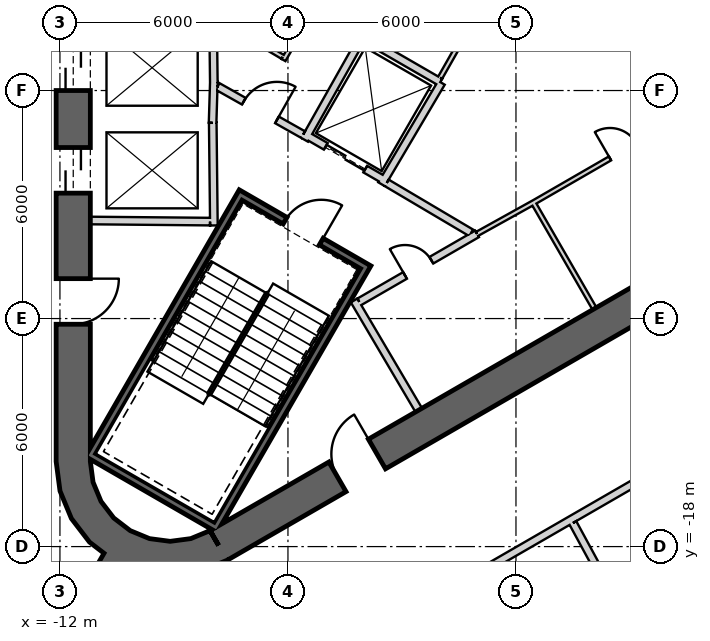
"""IFC4 building model, lengths in metres.
Left out: names, types, materials, properties, quantities, classifications, styles, units other than length and angle.
Written with IfcOpenShell. Run it as: python <this file> out.ifc"""

import sys

from ifc_helpers import new_model, si_unit, direction, frame, frame_2d, origin, place, context, subcontext, project, spatial, polyline, rectangle, outline, extrude, element, fill, save


model = new_model("IFC4")
c1 = context("Model", 3, precision=1e-05, world=origin(), true_north=direction((0.0, 1.0)))
c2 = subcontext(c1, "Body", "Model", "MODEL_VIEW")
j1 = project(units=[si_unit("LENGTHUNIT", "METRE"), si_unit("PLANEANGLEUNIT", "RADIAN")], contexts=[c1])
p1 = place(None, origin())
s1 = spatial("IfcSite", under=j1, at=p1, CompositionType="ELEMENT")
p2 = place(p1, origin())
s2 = spatial("IfcBuilding", under=s1, at=p2, CompositionType="ELEMENT")
p3 = place(p2, frame((0.0, 0.0, 322.1)))
s3 = spatial("IfcBuildingStorey", under=s2, at=p3, CompositionType="ELEMENT", Elevation=322.1)
p4 = place(p3, frame((-11.65, 15.762, 0.0), z_axis=(0.0, 0.0, 1.0), x_axis=(0.0, -1.0, 0.0)))
e1 = element("IfcWall", 1, at=p4, inside=s3, PredefinedType="SHEAR", context=c2, shape_type="SweptSolid", body=[
    extrude(rectangle(XDim=31.523, YDim=0.9, at=frame_2d((15.762, 0.0))), origin(), (0.0, 0.0, 1.0), 3.9),
])
p5 = place(p4, frame((7.062, 0.0, 0.0)))
e2 = element("IfcOpeningElement", 2, at=p5, cuts=e1, PredefinedType="OPENING", context=c2, shape_type="SweptSolid", body=[
    extrude(rectangle(XDim=1.2, YDim=2.4, at=frame_2d((0.6, 1.2))), frame((0.0, 0.46, 0.0), z_axis=(0.0, -1.0, 0.0), x_axis=(1.0, 0.0, 0.0)), (0.0, 0.0, 1.0), 0.92),
])
p6 = place(p4, frame((9.762, 0.0, 0.0)))
e3 = element("IfcOpeningElement", 3, at=p6, cuts=e1, PredefinedType="OPENING", context=c2, shape_type="SweptSolid", body=[
    extrude(rectangle(XDim=1.2, YDim=2.4, at=frame_2d((0.6, 1.2))), frame((0.0, 0.46, 0.0), z_axis=(0.0, -1.0, 0.0), x_axis=(1.0, 0.0, 0.0)), (0.0, 0.0, 1.0), 0.92),
])
p7 = place(p4, frame((12.462, 0.0, 0.0)))
e4 = element("IfcOpeningElement", 4, at=p7, cuts=e1, PredefinedType="OPENING", context=c2, shape_type="SweptSolid", body=[
    extrude(rectangle(XDim=1.2, YDim=2.4, at=frame_2d((0.6, 1.2))), frame((0.0, 0.46, 0.0), z_axis=(0.0, -1.0, 0.0), x_axis=(1.0, 0.0, 0.0)), (0.0, 0.0, 1.0), 0.92),
])
p8 = place(p4, frame((15.162, 0.0, 0.0)))
e5 = element("IfcOpeningElement", 5, at=p8, cuts=e1, PredefinedType="OPENING", context=c2, shape_type="SweptSolid", body=[
    extrude(rectangle(XDim=1.2, YDim=2.4, at=frame_2d((0.6, 1.2))), frame((0.0, 0.46, 0.0), z_axis=(0.0, -1.0, 0.0), x_axis=(1.0, 0.0, 0.0)), (0.0, 0.0, 1.0), 0.92),
])
p9 = place(p4, frame((17.862, 0.0, 0.0)))
e6 = element("IfcOpeningElement", 6, at=p9, cuts=e1, PredefinedType="OPENING", context=c2, shape_type="SweptSolid", body=[
    extrude(rectangle(XDim=1.2, YDim=2.4, at=frame_2d((0.6, 1.2))), frame((0.0, 0.46, 0.0), z_axis=(0.0, -1.0, 0.0), x_axis=(1.0, 0.0, 0.0)), (0.0, 0.0, 1.0), 0.92),
])
p10 = place(p4, frame((20.562, 0.0, 0.0)))
e7 = element("IfcOpeningElement", 7, at=p10, cuts=e1, PredefinedType="OPENING", context=c2, shape_type="SweptSolid", body=[
    extrude(rectangle(XDim=1.2, YDim=2.4, at=frame_2d((0.6, 1.2))), frame((0.0, 0.46, 0.0), z_axis=(0.0, -1.0, 0.0), x_axis=(1.0, 0.0, 0.0)), (0.0, 0.0, 1.0), 0.92),
])
p11 = place(p4, frame((23.262, 0.0, 0.0)))
e8 = element("IfcOpeningElement", 8, at=p11, cuts=e1, PredefinedType="OPENING", context=c2, shape_type="SweptSolid", body=[
    extrude(rectangle(XDim=1.2, YDim=2.4, at=frame_2d((0.6, 1.2))), frame((0.0, 0.46, 0.0), z_axis=(0.0, -1.0, 0.0), x_axis=(1.0, 0.0, 0.0)), (0.0, 0.0, 1.0), 0.92),
])
p12 = place(p4, frame((3.612, 0.0, 0.0)))
e9 = element("IfcOpeningElement", 9, at=p12, cuts=e1, PredefinedType="OPENING", context=c2, shape_type="SweptSolid", body=[
    extrude(rectangle(XDim=1.2, YDim=2.4, at=frame_2d((0.6, 1.2))), frame((0.0, 0.46, 0.0), z_axis=(0.0, -1.0, 0.0), x_axis=(1.0, 0.0, 0.0)), (0.0, 0.0, 1.0), 0.92),
])
p13 = place(p4, frame((26.712, 0.0, 0.0)))
e10 = element("IfcOpeningElement", 10, at=p13, cuts=e1, PredefinedType="OPENING", context=c2, shape_type="SweptSolid", body=[
    extrude(rectangle(XDim=1.2, YDim=2.4, at=frame_2d((0.6, 1.2))), frame((0.0, 0.46, 0.0), z_axis=(0.0, -1.0, 0.0), x_axis=(1.0, 0.0, 0.0)), (0.0, 0.0, 1.0), 0.92),
])
p14 = place(p3, frame((-7.825, -17.97, 0.0), z_axis=(0.0, 0.0, 1.0), x_axis=(0.866028369851, 0.499994862586, 0.0)))
e11 = element("IfcWall", 11, at=p14, inside=s3, PredefinedType="SHEAR", context=c2, shape_type="SweptSolid", body=[
    extrude(rectangle(XDim=31.523, YDim=0.9, at=frame_2d((15.762, 0.0))), origin(), (0.0, 0.0, 1.0), 3.9),
])
p15 = place(p14, frame((17.862, 0.0, 0.0)))
e12 = element("IfcOpeningElement", 12, at=p15, cuts=e11, PredefinedType="OPENING", context=c2, shape_type="SweptSolid", body=[
    extrude(rectangle(XDim=1.2, YDim=2.4, at=frame_2d((0.6, 1.2))), frame((0.0, 0.46, 0.0), z_axis=(0.0, -1.0, 0.0), x_axis=(1.0, 0.0, 0.0)), (0.0, 0.0, 1.0), 0.92),
])
p16 = place(p14, frame((20.562, 0.0, 0.0)))
e13 = element("IfcOpeningElement", 13, at=p16, cuts=e11, PredefinedType="OPENING", context=c2, shape_type="SweptSolid", body=[
    extrude(rectangle(XDim=1.2, YDim=2.4, at=frame_2d((0.6, 1.2))), frame((0.0, 0.46, 0.0), z_axis=(0.0, -1.0, 0.0), x_axis=(1.0, 0.0, 0.0)), (0.0, 0.0, 1.0), 0.92),
])
p17 = place(p14, frame((26.712, 0.0, 0.0)))
e14 = element("IfcOpeningElement", 14, at=p17, cuts=e11, PredefinedType="OPENING", context=c2, shape_type="SweptSolid", body=[
    extrude(rectangle(XDim=1.2, YDim=2.4, at=frame_2d((0.6, 1.2))), frame((0.0, 0.46, 0.0), z_axis=(0.0, -1.0, 0.0), x_axis=(1.0, 0.0, 0.0)), (0.0, 0.0, 1.0), 0.92),
])
p18 = place(p14, frame((3.612, 0.0, 0.0)))
e15 = element("IfcOpeningElement", 15, at=p18, cuts=e11, PredefinedType="OPENING", context=c2, shape_type="SweptSolid", body=[
    extrude(rectangle(XDim=1.2, YDim=2.4, at=frame_2d((0.6, 1.2))), frame((0.0, 0.46, 0.0), z_axis=(0.0, -1.0, 0.0), x_axis=(1.0, 0.0, 0.0)), (0.0, 0.0, 1.0), 0.92),
])
p19 = place(p3, origin())
e16 = element("IfcWall", 16, at=p19, inside=s3, PredefinedType="SHEAR", context=c2, shape_type="SweptSolid", body=[
    extrude(outline(polyline([(-12.1, -15.762), (-11.998, -16.538), (-11.698, -17.262), (-11.221, -17.883), (-10.6, -18.36), (-9.876, -18.659), (-9.1, -18.762), (-8.323, -18.659), (-7.6, -18.36), (-8.05, -17.58), (-8.556, -17.79), (-9.1, -17.862), (-9.644, -17.79), (-10.15, -17.58), (-10.585, -17.247), (-10.919, -16.812), (-11.128, -16.305), (-11.2, -15.762), (-12.1, -15.762)])), origin(), (0.0, 0.0, 1.0), 3.9),
])
p20 = place(p3, frame((-10.575, -18.316, 0.0), z_axis=(0.0, 0.0, 1.0), x_axis=(-0.499987805019, -0.866032444446, 0.0)))
e17 = element("IfcWall", 17, at=p20, inside=s3, PredefinedType="SHEAR", context=c2, shape_type="SweptSolid", body=[
    extrude(rectangle(XDim=8.787, YDim=0.6, at=frame_2d((4.394, 0.0))), origin(), (0.0, 0.0, 1.0), 3.9),
])
p21 = place(p20, frame((1.4, 0.0, 0.0)))
e18 = element("IfcOpeningElement", 18, at=p21, cuts=e17, PredefinedType="OPENING", context=c2, shape_type="SweptSolid", body=[
    extrude(rectangle(XDim=1.4, YDim=2.4, at=frame_2d((0.7, 1.2))), frame((0.0, 0.31, 0.0), z_axis=(0.0, -1.0, 0.0), x_axis=(1.0, 0.0, 0.0)), (0.0, 0.0, 1.0), 0.62),
])
p22 = place(p3, frame((-7.95, -5.772, 0.0), z_axis=(0.0, 0.0, 1.0), x_axis=(-0.030803413295, -0.999525462272, 0.0)))
e19 = element("IfcWall", 19, at=p22, inside=s3, PredefinedType="PLUMBINGWALL", context=c2, shape_type="SweptSolid", body=[
    extrude(rectangle(XDim=1.078, YDim=0.2, at=frame_2d((0.539, 0.0))), origin(), (0.0, 0.0, 1.0), 3.6),
])
p23 = place(p3, frame((-7.971, -4.05, 0.0), z_axis=(0.0, 0.0, 1.0), x_axis=(0.012042535896, -0.999927486035, 0.0)))
e20 = element("IfcWall", 20, at=p23, inside=s3, PredefinedType="PLUMBINGWALL", context=c2, shape_type="SweptSolid", body=[
    extrude(rectangle(XDim=1.845, YDim=0.2, at=frame_2d((0.922, 0.0))), origin(), (0.0, 0.0, 1.0), 3.6),
])
p24 = place(p3, frame((-7.979, -6.85, 0.0), z_axis=(0.0, 0.0, 1.0), x_axis=(0.011121475088, -0.999938154483, 0.0)))
e21 = element("IfcWall", 21, at=p24, inside=s3, PredefinedType="PLUMBINGWALL", context=c2, shape_type="SweptSolid", body=[
    extrude(rectangle(XDim=2.7, YDim=0.2, at=frame_2d((1.35, 0.0))), origin(), (0.0, 0.0, 1.0), 3.6),
])
p25 = place(p3, frame((-8.05, -9.449, 0.0), z_axis=(0.0, 0.0, 1.0), x_axis=(-0.999957467379, 0.009222983926, 0.0)))
e22 = element("IfcWall", 22, at=p25, inside=s3, PredefinedType="PLUMBINGWALL", context=c2, shape_type="SweptSolid", body=[
    extrude(rectangle(XDim=3.15, YDim=0.2, at=frame_2d((1.575, 0.0))), origin(), (0.0, 0.0, 1.0), 3.6),
])
p26 = place(p3, frame((-3.905, -10.563, -0.3), z_axis=(0.0, 0.0, 1.0), x_axis=(-0.500012932018, -0.866017937352, 0.0)))
e23 = element("IfcWall", 23, at=p26, inside=s3, PredefinedType="SHEAR", context=c2, shape_type="SweptSolid", body=[
    extrude(rectangle(XDim=8.1, YDim=0.2, at=frame_2d((4.05, 0.0))), origin(), (0.0, 0.0, 1.0), 3.9),
])
p27 = place(p3, frame((-11.282, -15.541, -0.3), z_axis=(0.0, 0.0, 1.0), x_axis=(0.866000483506, -0.500043160704, 0.0)))
e24 = element("IfcWall", 24, at=p27, inside=s3, PredefinedType="SHEAR", context=c2, shape_type="SweptSolid", body=[
    extrude(rectangle(XDim=3.8, YDim=0.2, at=frame_2d((1.9, 0.0))), origin(), (0.0, 0.0, 1.0), 3.9),
])
p28 = place(p3, frame((-7.196, -8.663, -0.3), z_axis=(0.0, 0.0, 1.0), x_axis=(-0.499997992926, -0.866026562566, 0.0)))
e25 = element("IfcWall", 25, at=p28, inside=s3, PredefinedType="SHEAR", context=c2, shape_type="SweptSolid", body=[
    extrude(rectangle(XDim=7.9, YDim=0.2, at=frame_2d((3.95, 0.0))), origin(), (0.0, 0.0, 1.0), 3.9),
])
p29 = place(p3, frame((-4.041, -10.599, -0.3), z_axis=(0.0, 0.0, 1.0), x_axis=(-0.866047807691, 0.499961193289, 0.0)))
e26 = element("IfcWall", 26, at=p29, inside=s3, PredefinedType="SHEAR", context=c2, shape_type="SweptSolid", body=[
    extrude(rectangle(XDim=3.6, YDim=0.2, at=frame_2d((1.8, 0.0))), origin(), (0.0, 0.0, 1.0), 3.9),
])
p30 = place(p29, frame((1.25, 0.0, 0.3)))
e27 = element("IfcOpeningElement", 27, at=p30, cuts=e26, PredefinedType="OPENING", context=c2, shape_type="SweptSolid", body=[
    extrude(rectangle(XDim=1.1, YDim=2.1, at=frame_2d((0.55, 1.05))), frame((0.0, 0.11, 0.0), z_axis=(0.0, -1.0, 0.0), x_axis=(1.0, 0.0, 0.0)), (0.0, 0.0, 1.0), 0.22),
])
p31 = place(p3, frame((-3.446, -8.368, 0.0), z_axis=(0.0, 0.0, 1.0), x_axis=(-0.866024647952, 0.500001309137, 0.0)))
e28 = element("IfcWall", 28, at=p31, inside=s3, PredefinedType="PLUMBINGWALL", context=c2, shape_type="SweptSolid", body=[
    extrude(rectangle(XDim=2.4, YDim=0.2, at=frame_2d((1.2, 0.0))), origin(), (0.0, 0.0, 1.0), 3.6),
])
p32 = place(p31, frame((0.6, 0.0, 0.0)))
e29 = element("IfcOpeningElement", 29, at=p32, cuts=e28, PredefinedType="OPENING", context=c2, shape_type="SweptSolid", body=[
    extrude(rectangle(XDim=1.2, YDim=2.4, at=frame_2d((0.6, 1.2))), frame((0.0, 0.11, 0.0), z_axis=(0.0, -1.0, 0.0), x_axis=(1.0, 0.0, 0.0)), (0.0, 0.0, 1.0), 0.22),
])
p33 = place(p3, frame((-1.961, -5.796, 0.0), z_axis=(0.0, 0.0, 1.0), x_axis=(-0.508647062354, -0.860975125052, 0.0)))
e30 = element("IfcWall", 30, at=p33, inside=s3, PredefinedType="PLUMBINGWALL", context=c2, shape_type="SweptSolid", body=[
    extrude(rectangle(XDim=3.1, YDim=0.2, at=frame_2d((1.55, 0.0))), origin(), (0.0, 0.0, 1.0), 3.6),
])
p34 = place(p3, frame((-3.99, -4.509, 0.0), z_axis=(0.0, 0.0, 1.0), x_axis=(-0.491358283181, -0.870957540612, 0.0)))
e31 = element("IfcWall", 31, at=p34, inside=s3, PredefinedType="PLUMBINGWALL", context=c2, shape_type="SweptSolid", body=[
    extrude(rectangle(XDim=3.2, YDim=0.2, at=frame_2d((1.6, 0.0))), origin(), (0.0, 0.0, 1.0), 3.6),
])
p35 = place(p3, frame((-3.953, -4.646, 0.0), z_axis=(0.0, 0.0, 1.0), x_axis=(0.866065302921, -0.4999308863, 0.0)))
e32 = element("IfcWall", 32, at=p35, inside=s3, PredefinedType="PLUMBINGWALL", context=c2, shape_type="SweptSolid", body=[
    extrude(rectangle(XDim=2.264, YDim=0.2, at=frame_2d((1.132, 0.0))), origin(), (0.0, 0.0, 1.0), 3.6),
])
p36 = place(p3, frame((2.067, -11.74, 0.0), z_axis=(0.0, 0.0, 1.0), x_axis=(-0.499984717929, 0.866034226713, 0.0)))
e33 = element("IfcWall", 33, at=p36, inside=s3, PredefinedType="PARTITIONING", context=c2, shape_type="SweptSolid", body=[
    extrude(rectangle(XDim=3.25, YDim=0.12, at=frame_2d((1.625, 0.0))), origin(), (0.0, 0.0, 1.0), 3.6),
])
p37 = place(p3, frame((-4.26, -11.524, 0.0), z_axis=(0.0, 0.0, 1.0), x_axis=(0.507997497166, -0.861358544901, 0.0)))
e34 = element("IfcWall", 34, at=p37, inside=s3, PredefinedType="PARTITIONING", context=c2, shape_type="SweptSolid", body=[
    extrude(rectangle(XDim=3.35, YDim=0.2, at=frame_2d((1.675, 0.0))), origin(), (0.0, 0.0, 1.0), 3.6),
])
p38 = place(p3, frame((-1.024, -9.771, 0.0), z_axis=(0.0, 0.0, 1.0), x_axis=(-0.866029903013, -0.499992207027, 0.0)))
e35 = element("IfcWall", 35, at=p38, inside=s3, PredefinedType="PARTITIONING", context=c2, shape_type="SweptSolid", body=[
    extrude(rectangle(XDim=3.578, YDim=0.2, at=frame_2d((1.789, 0.0))), origin(), (0.0, 0.0, 1.0), 3.6),
])
p39 = place(p38, frame((1.389, 0.0, 0.0)))
e36 = element("IfcOpeningElement", 36, at=p39, cuts=e35, PredefinedType="OPENING", context=c2, shape_type="SweptSolid", body=[
    extrude(rectangle(XDim=0.8, YDim=2.1, at=frame_2d((0.4, 1.05))), frame((0.0, 0.11, 0.0), z_axis=(0.0, -1.0, 0.0), x_axis=(1.0, 0.0, 0.0)), (0.0, 0.0, 1.0), 0.22),
])
p40 = place(p3, frame((-1.023, -9.772, 0.0), z_axis=(0.0, 0.0, 1.0), x_axis=(0.874290944206, 0.485402250592, 0.0)))
e37 = element("IfcWall", 37, at=p40, inside=s3, PredefinedType="PARTITIONING", context=c2, shape_type="SweptSolid", body=[
    extrude(rectangle(XDim=1.723, YDim=0.12, at=frame_2d((0.861, 0.0))), origin(), (0.0, 0.0, 1.0), 3.6),
])
p41 = place(p3, frame((0.483, -8.936, 0.0), z_axis=(0.0, 0.0, 1.0), x_axis=(0.866028230842, 0.499995103361, 0.0)))
e38 = element("IfcWall", 38, at=p41, inside=s3, PredefinedType="PARTITIONING", context=c2, shape_type="SweptSolid", body=[
    extrude(rectangle(XDim=5.4, YDim=0.12, at=frame_2d((2.7, 0.0))), origin(), (0.0, 0.0, 1.0), 3.6),
])
p42 = place(p41, frame((2.3, 0.0, 0.0)))
e39 = element("IfcOpeningElement", 39, at=p42, cuts=e38, PredefinedType="OPENING", context=c2, shape_type="SweptSolid", body=[
    extrude(rectangle(XDim=0.8, YDim=2.1, at=frame_2d((0.4, 1.05))), frame((0.0, 0.07, 0.0), z_axis=(0.0, -1.0, 0.0), x_axis=(1.0, 0.0, 0.0)), (0.0, 0.0, 1.0), 0.14),
])
p43 = place(p3, frame((-3.401, -8.43, 0.0), z_axis=(0.0, 0.0, 1.0), x_axis=(0.860630814782, -0.509229418482, 0.0)))
e40 = element("IfcWall", 40, at=p43, inside=s3, PredefinedType="PARTITIONING", context=c2, shape_type="SweptSolid", body=[
    extrude(rectangle(XDim=2.582, YDim=0.2, at=frame_2d((1.291, 0.0))), origin(), (0.0, 0.0, 1.0), 3.6),
])
p44 = place(p3, frame((-7.849, -5.894, 0.0), z_axis=(0.0, 0.0, 1.0), x_axis=(0.871363259478, -0.490638431059, 0.0)))
e41 = element("IfcWall", 41, at=p44, inside=s3, PredefinedType="PARTITIONING", context=c2, shape_type="SweptSolid", body=[
    extrude(rectangle(XDim=2.581, YDim=0.2, at=frame_2d((1.291, 0.0))), origin(), (0.0, 0.0, 1.0), 3.6),
])
p45 = place(p44, frame((0.791, 0.0, 0.0)))
e42 = element("IfcOpeningElement", 42, at=p45, cuts=e41, PredefinedType="OPENING", context=c2, shape_type="SweptSolid", body=[
    extrude(rectangle(XDim=1.0, YDim=2.1, at=frame_2d((0.5, 1.05))), frame((0.0, 0.11, 0.0), z_axis=(0.0, -1.0, 0.0), x_axis=(1.0, 0.0, 0.0)), (0.0, 0.0, 1.0), 0.22),
])
p46 = place(p3, frame((0.224, -1.761, 0.0), z_axis=(0.0, 0.0, 1.0), x_axis=(-0.494327216836, -0.869275907118, 0.0)))
e43 = element("IfcWall", 43, at=p46, inside=s3, PredefinedType="PARTITIONING", context=c2, shape_type="SweptSolid", body=[
    extrude(rectangle(XDim=4.487, YDim=0.12, at=frame_2d((2.244, 0.0))), origin(), (0.0, 0.0, 1.0), 3.6),
])
p47 = place(p46, frame((1.895, 0.0, 0.0)))
e44 = element("IfcOpeningElement", 44, at=p47, cuts=e43, PredefinedType="OPENING", context=c2, shape_type="SweptSolid", body=[
    extrude(rectangle(XDim=0.8, YDim=2.1, at=frame_2d((0.4, 1.05))), frame((0.0, 0.07, 0.0), z_axis=(0.0, -1.0, 0.0), x_axis=(1.0, 0.0, 0.0)), (0.0, 0.0, 1.0), 0.14),
])
p48 = place(p3, frame((-6.118, -5.197, 0.0), z_axis=(0.0, 0.0, 1.0), x_axis=(0.499990139034, 0.866031096941, 0.0)))
e45 = element("IfcWall", 45, at=p48, inside=s3, PredefinedType="PARTITIONING", context=c2, shape_type="SweptSolid", body=[
    extrude(rectangle(XDim=3.0, YDim=0.12, at=frame_2d((1.5, 0.0))), origin(), (0.0, 0.0, 1.0), 3.6),
])
p49 = place(p3, frame((-7.95, -4.041, 0.0), z_axis=(0.0, 0.0, 1.0), x_axis=(0.860112457103, -0.510104461004, 0.0)))
e46 = element("IfcWall", 46, at=p49, inside=s3, PredefinedType="PARTITIONING", context=c2, shape_type="SweptSolid", body=[
    extrude(rectangle(XDim=2.104, YDim=0.12, at=frame_2d((1.052, 0.0))), origin(), (0.0, 0.0, 1.0), 3.6),
])
p50 = place(p3, frame((-6.505, -21.885, 0.0), z_axis=(0.0, 0.0, 1.0), x_axis=(0.86602457258, 0.500001439686, 0.0)))
e47 = element("IfcWall", 47, at=p50, inside=s3, PredefinedType="PARTITIONING", context=c2, shape_type="SweptSolid", body=[
    extrude(rectangle(XDim=32.952, YDim=0.2, at=frame_2d((16.476, 0.0))), origin(), (0.0, 0.0, 1.0), 2.97),
])
p51 = place(p50, frame((20.569, 0.0, 0.0)))
e48 = element("IfcOpeningElement", 48, at=p51, cuts=e47, PredefinedType="OPENING", context=c2, shape_type="SweptSolid", body=[
    extrude(rectangle(XDim=1.0, YDim=2.1, at=frame_2d((0.5, 1.05))), frame((0.0, 0.11, 0.0), z_axis=(0.0, -1.0, 0.0), x_axis=(1.0, 0.0, 0.0)), (0.0, 0.0, 1.0), 0.22),
])
p52 = place(p50, frame((4.143, 0.0, 0.0)))
e49 = element("IfcOpeningElement", 49, at=p52, cuts=e47, PredefinedType="OPENING", context=c2, shape_type="SweptSolid", body=[
    extrude(rectangle(XDim=1.0, YDim=2.1, at=frame_2d((0.5, 1.05))), frame((0.0, 0.11, 0.0), z_axis=(0.0, -1.0, 0.0), x_axis=(1.0, 0.0, 0.0)), (0.0, 0.0, 1.0), 0.22),
])
p53 = place(p3, frame((1.499, -17.379, 0.0), z_axis=(0.0, 0.0, 1.0), x_axis=(0.477249140753, -0.87876803404, 0.0)))
e50 = element("IfcWall", 50, at=p53, inside=s3, PredefinedType="PARTITIONING", context=c2, shape_type="SweptSolid", body=[
    extrude(rectangle(XDim=10.516, YDim=0.2, at=frame_2d((5.258, 0.0))), origin(), (0.0, 0.0, 1.0), 2.97),
])
p54 = place(p30, origin())
e51 = element("IfcDoor", 51, at=p54, inside=s3, OperationType="SINGLE_SWING_LEFT", PredefinedType="USERDEFINED", context=c2, shape_type="SweptSolid", body=[
    extrude(rectangle(XDim=1.1, YDim=2.1, at=frame_2d((0.55, 1.05))), frame((0.0, 0.025, 0.0), z_axis=(0.0, -1.0, 0.0), x_axis=(1.0, 0.0, 0.0)), (0.0, 0.0, 1.0), 0.05),
])
fill(e27, e51)
p55 = place(p45, origin())
e52 = element("IfcDoor", 52, at=p55, inside=s3, OperationType="SINGLE_SWING_RIGHT", PredefinedType="USERDEFINED", context=c2, shape_type="SweptSolid", body=[
    extrude(rectangle(XDim=1.0, YDim=2.1, at=frame_2d((0.5, 1.05))), frame((0.0, 0.025, 0.0), z_axis=(0.0, -1.0, 0.0), x_axis=(1.0, 0.0, 0.0)), (0.0, 0.0, 1.0), 0.05),
])
fill(e42, e52)
p56 = place(p32, origin())
e53 = element("IfcDoor", 53, at=p56, inside=s3, OperationType="SLIDING_TO_LEFT", PredefinedType="USERDEFINED", context=c2, shape_type="SweptSolid", body=[
    extrude(rectangle(XDim=1.2, YDim=2.4, at=frame_2d((0.6, 1.2))), frame((0.0, 0.025, 0.0), z_axis=(0.0, -1.0, 0.0), x_axis=(1.0, 0.0, 0.0)), (0.0, 0.0, 1.0), 0.05),
])
fill(e29, e53)
p57 = place(p39, origin())
e54 = element("IfcDoor", 54, at=p57, inside=s3, OperationType="SINGLE_SWING_LEFT", PredefinedType="USERDEFINED", context=c2, shape_type="SweptSolid", body=[
    extrude(rectangle(XDim=0.8, YDim=2.1, at=frame_2d((0.4, 1.05))), frame((0.0, 0.025, 0.0), z_axis=(0.0, -1.0, 0.0), x_axis=(1.0, 0.0, 0.0)), (0.0, 0.0, 1.0), 0.05),
])
fill(e36, e54)
p58 = place(p42, origin())
e55 = element("IfcDoor", 55, at=p58, inside=s3, OperationType="SINGLE_SWING_LEFT", PredefinedType="USERDEFINED", context=c2, shape_type="SweptSolid", body=[
    extrude(rectangle(XDim=0.8, YDim=2.1, at=frame_2d((0.4, 1.05))), frame((0.0, 0.025, 0.0), z_axis=(0.0, -1.0, 0.0), x_axis=(1.0, 0.0, 0.0)), (0.0, 0.0, 1.0), 0.05),
])
fill(e39, e55)
p59 = place(p10, origin())
e56 = element("IfcDoor", 56, at=p59, inside=s3, OperationType="SLIDING_TO_LEFT", PredefinedType="USERDEFINED", context=c2, shape_type="SweptSolid", body=[
    extrude(rectangle(XDim=1.2, YDim=2.4, at=frame_2d((0.6, 1.2))), frame((0.0, 0.025, 0.0), z_axis=(0.0, -1.0, 0.0), x_axis=(1.0, 0.0, 0.0)), (0.0, 0.0, 1.0), 0.05),
])
fill(e7, e56)
p60 = place(p11, origin())
e57 = element("IfcDoor", 57, at=p60, inside=s3, OperationType="SLIDING_TO_LEFT", PredefinedType="USERDEFINED", context=c2, shape_type="SweptSolid", body=[
    extrude(rectangle(XDim=1.2, YDim=2.4, at=frame_2d((0.6, 1.2))), frame((0.0, 0.025, 0.0), z_axis=(0.0, -1.0, 0.0), x_axis=(1.0, 0.0, 0.0)), (0.0, 0.0, 1.0), 0.05),
])
fill(e8, e57)
p61 = place(p13, origin())
e58 = element("IfcDoor", 58, at=p61, inside=s3, OperationType="SINGLE_SWING_LEFT", PredefinedType="USERDEFINED", context=c2, shape_type="SweptSolid", body=[
    extrude(rectangle(XDim=1.2, YDim=2.4, at=frame_2d((0.6, 1.2))), frame((0.0, 0.025, 0.0), z_axis=(0.0, -1.0, 0.0), x_axis=(1.0, 0.0, 0.0)), (0.0, 0.0, 1.0), 0.05),
])
fill(e10, e58)
p62 = place(p18, origin())
e59 = element("IfcDoor", 59, at=p62, inside=s3, OperationType="SINGLE_SWING_RIGHT", PredefinedType="USERDEFINED", context=c2, shape_type="SweptSolid", body=[
    extrude(rectangle(XDim=1.2, YDim=2.4, at=frame_2d((0.6, 1.2))), frame((0.0, 0.025, 0.0), z_axis=(0.0, -1.0, 0.0), x_axis=(1.0, 0.0, 0.0)), (0.0, 0.0, 1.0), 0.05),
])
fill(e15, e59)
save(model, sys.argv[1])
